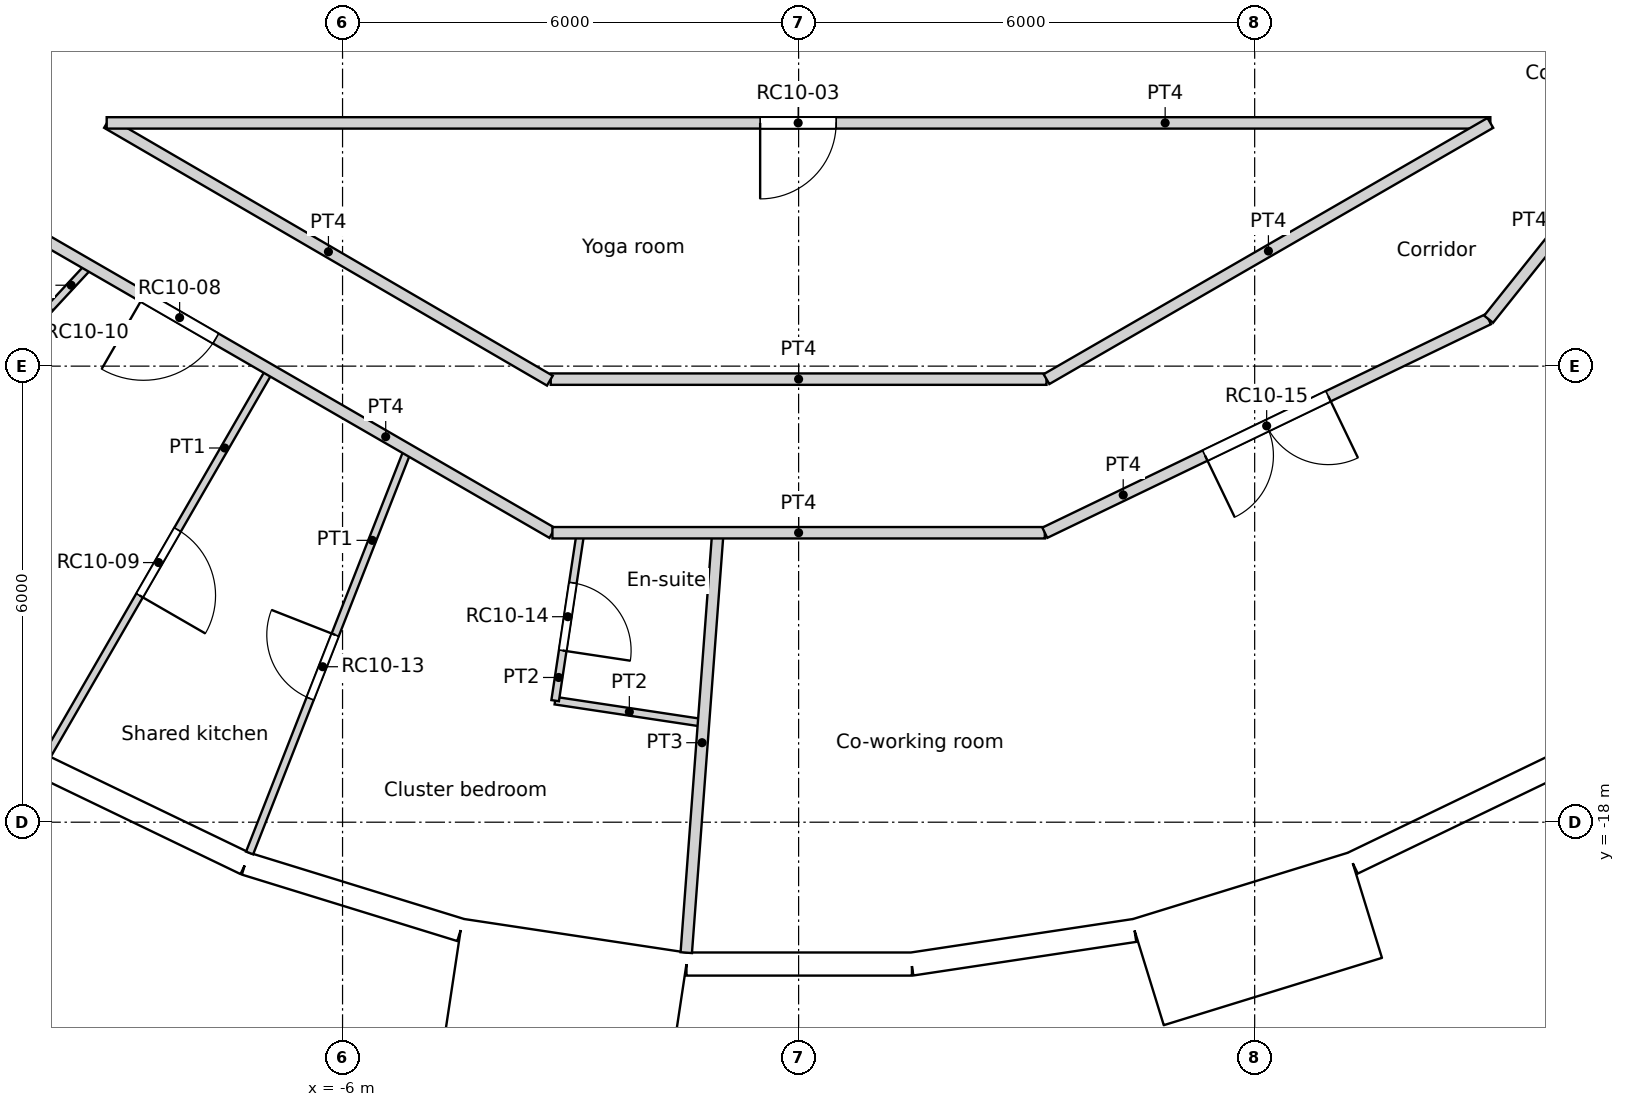
"""IFC4 building model, lengths in metres.
Left out: names, types, materials, properties, quantities, classifications, styles, units other than length and angle.
Written with IfcOpenShell. Run it as: python <this file> out.ifc"""

import sys

from ifc_helpers import new_model, si_unit, direction, frame, frame_2d, origin, origin_2d, place, context, subcontext, project, spatial, rectangle, circle, extrude, element, fill, save


model = new_model("IFC4")
c1 = context("Model", 3, precision=1e-05, world=origin(), true_north=direction((0.0, 1.0)))
c2 = subcontext(c1, "Body", "Model", "MODEL_VIEW")
j1 = project(units=[si_unit("LENGTHUNIT", "METRE"), si_unit("PLANEANGLEUNIT", "RADIAN")], contexts=[c1])
p1 = place(None, origin())
s1 = spatial("IfcSite", under=j1, at=p1, CompositionType="ELEMENT")
p2 = place(p1, origin())
s2 = spatial("IfcBuilding", under=s1, at=p2, CompositionType="ELEMENT")
p3 = place(p2, frame((0.0, 0.0, 323.4)))
s3 = spatial("IfcBuildingStorey", under=s2, at=p3, CompositionType="ELEMENT", Elevation=323.4)
for number, where, z_axis, x_axis in (
    (1, (-9.411, -16.301, 0.0), (0.0, 0.0, 1.0), (1.0, 0.0, 0.0)),
    (2, (-4.188, -18.35, 0.0), (0.0, 0.0, 1.0), (1.0, 0.0, 0.0)),
    (3, (1.406, -18.77, 0.0), (0.0, 0.0, 1.0), (1.0, 0.0, 0.0)),
    (4, (6.876, -17.521, 0.0), (0.0, 0.0, 1.0), (1.0, 0.0, 0.0)),
):
    element("IfcColumn", number, at=place(p3, frame(where, z_axis=z_axis, x_axis=x_axis)), inside=s3, PredefinedType="COLUMN", context=c2, shape_type="SweptSolid", body=[
        extrude(circle(Radius=0.45, at=origin_2d()), origin(), (0.0, 0.0, 1.0), 3.6),
    ])
p4 = place(p3, frame((-9.947, -17.259, 0.0), z_axis=(0.0, 0.0, 1.0), x_axis=(0.900939615635, -0.433944476838, 0.0)))
e5 = element("IfcWall", 5, at=p4, inside=s3, PredefinedType="SOLIDWALL", context=c2, shape_type="SweptSolid", body=[
    extrude(rectangle(XDim=2.962, YDim=0.3, at=frame_2d((1.481, 0.0))), origin(), (0.0, 0.0, 1.0), 3.25),
])
p5 = place(p4, frame((1.481, 0.0, 1.55)))
e6 = element("IfcOpeningElement", 6, at=p5, cuts=e5, PredefinedType="OPENING", context=c2, shape_type="SweptSolid", body=[
    extrude(circle(Radius=0.9, at=origin_2d()), frame((0.0, 0.16, 0.0), z_axis=(0.0, -1.0, 0.0), x_axis=(1.0, 0.0, 0.0)), (0.0, 0.0, 1.0), 0.32),
])
p6 = place(p3, frame((-7.278, -18.545, 0.0), z_axis=(0.0, 0.0, 1.0), x_axis=(0.95558635705, -0.294711238707, 0.0)))
e7 = element("IfcWall", 7, at=p6, inside=s3, PredefinedType="SOLIDWALL", context=c2, shape_type="SweptSolid", body=[
    extrude(rectangle(XDim=2.962, YDim=0.3, at=frame_2d((1.481, 0.0))), origin(), (0.0, 0.0, 1.0), 3.25),
])
p7 = place(p6, frame((1.481, 0.0, 1.55)))
e8 = element("IfcOpeningElement", 8, at=p7, cuts=e7, PredefinedType="OPENING", context=c2, shape_type="SweptSolid", body=[
    extrude(circle(Radius=0.9, at=origin_2d()), frame((0.0, 0.16, 0.0), z_axis=(0.0, -1.0, 0.0), x_axis=(1.0, 0.0, 0.0)), (0.0, 0.0, 1.0), 0.32),
])
p8 = place(p3, frame((-4.53, -19.989, -0.35), z_axis=(0.0, 0.0, 1.0), x_axis=(0.988836445254, -0.149004981587, 0.0)))
e9 = element("IfcWall", 9, at=p8, inside=s3, PredefinedType="ELEMENTEDWALL", context=c2, shape_type="SweptSolid", body=[
    extrude(rectangle(XDim=3.0, YDim=1.45, at=frame_2d((1.5, 0.0))), origin(), (0.0, 0.0, 1.0), 3.6),
])
p9 = place(p8, frame((1.5, 0.0, 1.9)))
e10 = element("IfcOpeningElement", 10, at=p9, cuts=e9, PredefinedType="OPENING", context=c2, shape_type="SweptSolid", body=[
    extrude(circle(Radius=0.9, at=origin_2d()), frame((0.0, 0.735, 0.0), z_axis=(0.0, -1.0, 0.0), x_axis=(1.0, 0.0, 0.0)), (0.0, 0.0, 1.0), 1.47),
])
p10 = place(p3, frame((-1.473, -19.866, 0.0), z_axis=(0.0, 0.0, 1.0), x_axis=(1.0, 0.0, 0.0)))
e11 = element("IfcWall", 11, at=p10, inside=s3, PredefinedType="SOLIDWALL", context=c2, shape_type="SweptSolid", body=[
    extrude(rectangle(XDim=2.962, YDim=0.3, at=frame_2d((1.481, 0.0))), origin(), (0.0, 0.0, 1.0), 3.25),
])
p11 = place(p10, frame((1.481, 0.0, 1.55)))
e12 = element("IfcOpeningElement", 12, at=p11, cuts=e11, PredefinedType="OPENING", context=c2, shape_type="SweptSolid", body=[
    extrude(circle(Radius=0.9, at=origin_2d()), frame((0.0, 0.16, 0.0), z_axis=(0.0, -1.0, 0.0), x_axis=(1.0, 0.0, 0.0)), (0.0, 0.0, 1.0), 0.32),
])
p12 = place(p3, frame((1.489, -19.866, 0.0), z_axis=(0.0, 0.0, 1.0), x_axis=(0.988835775663, 0.149009425104, 0.0)))
e13 = element("IfcWall", 13, at=p12, inside=s3, PredefinedType="SOLIDWALL", context=c2, shape_type="SweptSolid", body=[
    extrude(rectangle(XDim=2.962, YDim=0.3, at=frame_2d((1.481, 0.0))), origin(), (0.0, 0.0, 1.0), 3.25),
])
p13 = place(p12, frame((1.481, 0.0, 1.55)))
e14 = element("IfcOpeningElement", 14, at=p13, cuts=e13, PredefinedType="OPENING", context=c2, shape_type="SweptSolid", body=[
    extrude(circle(Radius=0.9, at=origin_2d()), frame((0.0, 0.16, 0.0), z_axis=(0.0, -1.0, 0.0), x_axis=(1.0, 0.0, 0.0)), (0.0, 0.0, 1.0), 0.32),
])
p14 = place(p3, frame((4.592, -19.975, -0.35), z_axis=(0.0, 0.0, 1.0), x_axis=(0.955571139978, 0.294760574774, 0.0)))
e15 = element("IfcWall", 15, at=p14, inside=s3, PredefinedType="ELEMENTEDWALL", context=c2, shape_type="SweptSolid", body=[
    extrude(rectangle(XDim=3.0, YDim=1.45, at=frame_2d((1.5, 0.0))), origin(), (0.0, 0.0, 1.0), 3.6),
])
p15 = place(p14, frame((1.5, 0.0, 1.9)))
e16 = element("IfcOpeningElement", 16, at=p15, cuts=e15, PredefinedType="OPENING", context=c2, shape_type="SweptSolid", body=[
    extrude(circle(Radius=0.9, at=origin_2d()), frame((0.0, 0.735, 0.0), z_axis=(0.0, -1.0, 0.0), x_axis=(1.0, 0.0, 0.0)), (0.0, 0.0, 1.0), 1.47),
])
p16 = place(p3, frame((7.292, -18.538, 0.0), z_axis=(0.0, 0.0, 1.0), x_axis=(0.90095513435, 0.433912255978, 0.0)))
e17 = element("IfcWall", 17, at=p16, inside=s3, PredefinedType="SOLIDWALL", context=c2, shape_type="SweptSolid", body=[
    extrude(rectangle(XDim=2.962, YDim=0.3, at=frame_2d((1.481, 0.0))), origin(), (0.0, 0.0, 1.0), 3.25),
])
p17 = place(p16, frame((1.481, 0.0, 1.55)))
e18 = element("IfcOpeningElement", 18, at=p17, cuts=e17, PredefinedType="OPENING", context=c2, shape_type="SweptSolid", body=[
    extrude(circle(Radius=0.9, at=origin_2d()), frame((0.0, 0.16, 0.0), z_axis=(0.0, -1.0, 0.0), x_axis=(1.0, 0.0, 0.0)), (0.0, 0.0, 1.0), 0.32),
])
p18 = place(p3, frame((-9.103, -8.8, 0.0), z_axis=(0.0, 0.0, 1.0), x_axis=(1.0, 0.0, 0.0)))
e19 = element("IfcWall", 19, at=p18, inside=s3, PredefinedType="PARTITIONING", context=c2, shape_type="SweptSolid", body=[
    extrude(rectangle(XDim=18.204, YDim=0.15, at=frame_2d((9.102, 0.0))), origin(), (0.0, 0.0, 1.0), 3.25),
])
p19 = place(p18, frame((8.597, 0.0, 0.0)))
e20 = element("IfcOpeningElement", 20, at=p19, cuts=e19, PredefinedType="OPENING", context=c2, shape_type="SweptSolid", body=[
    extrude(rectangle(XDim=1.0, YDim=2.04, at=frame_2d((0.5, 1.02))), frame((0.0, 0.075, 0.0), z_axis=(0.0, -1.0, 0.0), x_axis=(1.0, 0.0, 0.0)), (0.0, 0.0, 1.0), 0.15),
])
p20 = place(p3, frame((9.078, -11.382, 0.0), z_axis=(0.0, 0.0, 1.0), x_axis=(0.624018330412, 0.781409702595, 0.0)))
e21 = element("IfcWall", 21, at=p20, inside=s3, PredefinedType="PARTITIONING", context=c2, shape_type="SweptSolid", body=[
    extrude(rectangle(XDim=3.301, YDim=0.15, at=frame_2d((1.65, 0.0))), origin(), (0.0, 0.0, 1.0), 3.25),
])
p21 = place(p3, frame((-9.099, -8.8, 0.0), z_axis=(0.0, 0.0, 1.0), x_axis=(0.864286794128, -0.502999341447, 0.0)))
e22 = element("IfcWall", 22, at=p21, inside=s3, PredefinedType="PARTITIONING", context=c2, shape_type="SweptSolid", body=[
    extrude(rectangle(XDim=6.741, YDim=0.15, at=frame_2d((3.371, 0.0))), origin(), (0.0, 0.0, 1.0), 3.25),
])
p22 = place(p3, frame((-10.671, -9.901, 0.0), z_axis=(0.0, 0.0, 1.0), x_axis=(0.865823993551, -0.500348690606, 0.0)))
e23 = element("IfcWall", 23, at=p22, inside=s3, PredefinedType="PARTITIONING", context=c2, shape_type="SweptSolid", body=[
    extrude(rectangle(XDim=8.582, YDim=0.15, at=frame_2d((4.291, 0.0))), origin(), (0.0, 0.0, 1.0), 3.25),
])
p23 = place(p22, frame((2.369, 0.0, 0.0)))
e24 = element("IfcOpeningElement", 24, at=p23, cuts=e23, PredefinedType="OPENING", context=c2, shape_type="SweptSolid", body=[
    extrude(rectangle(XDim=1.1, YDim=2.1, at=frame_2d((0.55, 1.05))), frame((0.0, 0.075, 0.0), z_axis=(0.0, -1.0, 0.0), x_axis=(1.0, 0.0, 0.0)), (0.0, 0.0, 1.0), 0.15),
])
p24 = place(p3, frame((-3.261, -12.171, 0.0), z_axis=(0.0, 0.0, 1.0), x_axis=(1.0, 0.0, 0.0)))
e25 = element("IfcWall", 25, at=p24, inside=s3, PredefinedType="PARTITIONING", context=c2, shape_type="SweptSolid", body=[
    extrude(rectangle(XDim=6.522, YDim=0.15, at=frame_2d((3.261, 0.0))), origin(), (0.0, 0.0, 1.0), 3.25),
])
p25 = place(p3, frame((3.261, -12.171, 0.0), z_axis=(0.0, 0.0, 1.0), x_axis=(0.866066809554, 0.499928276245, 0.0)))
e26 = element("IfcWall", 26, at=p25, inside=s3, PredefinedType="PARTITIONING", context=c2, shape_type="SweptSolid", body=[
    extrude(rectangle(XDim=6.743, YDim=0.15, at=frame_2d((3.371, 0.0))), origin(), (0.0, 0.0, 1.0), 3.25),
])
p26 = place(p3, frame((-3.239, -14.192, 0.0), z_axis=(0.0, 0.0, 1.0), x_axis=(1.0, 0.0, 0.0)))
e27 = element("IfcWall", 27, at=p26, inside=s3, PredefinedType="PARTITIONING", context=c2, shape_type="SweptSolid", body=[
    extrude(rectangle(XDim=6.478, YDim=0.15, at=frame_2d((3.239, 0.0))), origin(), (0.0, 0.0, 1.0), 3.25),
])
p27 = place(p3, frame((3.239, -14.192, 0.0), z_axis=(0.0, 0.0, 1.0), x_axis=(0.900976027191, 0.433868872388, 0.0)))
e28 = element("IfcWall", 28, at=p27, inside=s3, PredefinedType="PARTITIONING", context=c2, shape_type="SweptSolid", body=[
    extrude(rectangle(XDim=6.479, YDim=0.15, at=frame_2d((3.239, 0.0))), origin(), (0.0, 0.0, 1.0), 3.25),
])
p28 = place(p27, frame((2.34, 0.0, 0.0)))
e29 = element("IfcOpeningElement", 29, at=p28, cuts=e28, PredefinedType="OPENING", context=c2, shape_type="SweptSolid", body=[
    extrude(rectangle(XDim=1.8, YDim=2.1, at=frame_2d((0.9, 1.05))), frame((0.0, 0.075, 0.0), z_axis=(0.0, -1.0, 0.0), x_axis=(1.0, 0.0, 0.0)), (0.0, 0.0, 1.0), 0.15),
])
p29 = place(p3, frame((-9.886, -17.122, 0.0), z_axis=(0.0, 0.0, 1.0), x_axis=(0.500022903925, 0.866012179793, 0.0)))
e30 = element("IfcWall", 30, at=p29, inside=s3, PredefinedType="PARTITIONING", context=c2, shape_type="SweptSolid", body=[
    extrude(rectangle(XDim=5.862, YDim=0.1, at=frame_2d((2.931, 0.0))), origin(), (0.0, 0.0, 1.0), 3.25),
])
p30 = place(p29, frame((2.43, 0.0, 0.0)))
e31 = element("IfcOpeningElement", 31, at=p30, cuts=e30, PredefinedType="OPENING", context=c2, shape_type="SweptSolid", body=[
    extrude(rectangle(XDim=1.0, YDim=2.04, at=frame_2d((0.5, 1.02))), frame((0.0, 0.05, 0.0), z_axis=(0.0, -1.0, 0.0), x_axis=(1.0, 0.0, 0.0)), (0.0, 0.0, 1.0), 0.1),
])
p31 = place(p3, frame((-10.973, -12.447, 0.0), z_axis=(0.0, 0.0, 1.0), x_axis=(0.680296065293, 0.732937421303, 0.0)))
e32 = element("IfcWall", 32, at=p31, inside=s3, PredefinedType="PARTITIONING", context=c2, shape_type="SweptSolid", body=[
    extrude(rectangle(XDim=2.416, YDim=0.1, at=frame_2d((1.208, 0.0))), origin(), (0.0, 0.0, 1.0), 3.25),
])
p32 = place(p31, frame((0.758, 0.0, 0.0)))
e33 = element("IfcOpeningElement", 33, at=p32, cuts=e32, PredefinedType="OPENING", context=c2, shape_type="SweptSolid", body=[
    extrude(rectangle(XDim=0.9, YDim=2.0, at=frame_2d((0.45, 1.0))), frame((0.0, 0.05, 0.0), z_axis=(0.0, -1.0, 0.0), x_axis=(1.0, 0.0, 0.0)), (0.0, 0.0, 1.0), 0.1),
])
p33 = place(p3, frame((-7.223, -18.405, 0.0), z_axis=(0.0, 0.0, 1.0), x_axis=(0.365331902423, 0.930877328691, 0.0)))
e34 = element("IfcWall", 34, at=p33, inside=s3, PredefinedType="PARTITIONING", context=c2, shape_type="SweptSolid", body=[
    extrude(rectangle(XDim=5.704, YDim=0.1, at=frame_2d((2.852, 0.0))), origin(), (0.0, 0.0, 1.0), 3.25),
])
p34 = place(p33, frame((2.182, 0.0, 0.0)))
e35 = element("IfcOpeningElement", 35, at=p34, cuts=e34, PredefinedType="OPENING", context=c2, shape_type="SweptSolid", body=[
    extrude(rectangle(XDim=0.9, YDim=2.1, at=frame_2d((0.45, 1.05))), frame((0.0, 0.05, 0.0), z_axis=(0.0, -1.0, 0.0), x_axis=(1.0, 0.0, 0.0)), (0.0, 0.0, 1.0), 0.1),
])
p35 = place(p3, frame((-3.203, -16.401, 0.0), z_axis=(0.0, 0.0, 1.0), x_axis=(0.148960349288, 0.988843169739, 0.0)))
e36 = element("IfcWall", 36, at=p35, inside=s3, PredefinedType="PARTITIONING", context=c2, shape_type="SweptSolid", body=[
    extrude(rectangle(XDim=2.234, YDim=0.1, at=frame_2d((1.117, 0.0))), origin(), (0.0, 0.0, 1.0), 3.25),
])
p36 = place(p35, frame((0.667, 0.0, 0.0)))
e37 = element("IfcOpeningElement", 37, at=p36, cuts=e36, PredefinedType="OPENING", context=c2, shape_type="SweptSolid", body=[
    extrude(rectangle(XDim=0.9, YDim=2.04, at=frame_2d((0.45, 1.02))), frame((0.0, 0.05, 0.0), z_axis=(0.0, -1.0, 0.0), x_axis=(1.0, 0.0, 0.0)), (0.0, 0.0, 1.0), 0.1),
])
p37 = place(p3, frame((-3.203, -16.401, 0.0), z_axis=(0.0, 0.0, 1.0), x_axis=(0.988831780565, -0.149035934407, 0.0)))
e38 = element("IfcWall", 38, at=p37, inside=s3, PredefinedType="PARTITIONING", context=c2, shape_type="SweptSolid", body=[
    extrude(rectangle(XDim=1.974, YDim=0.1, at=frame_2d((0.987, 0.0))), origin(), (0.0, 0.0, 1.0), 3.25),
])
p38 = place(p3, frame((-1.478, -19.716, 0.0), z_axis=(0.0, 0.0, 1.0), x_axis=(0.074923617461, 0.997189275688, 0.0)))
e39 = element("IfcWall", 39, at=p38, inside=s3, PredefinedType="PARTITIONING", context=c2, shape_type="SweptSolid", body=[
    extrude(rectangle(XDim=5.54, YDim=0.15, at=frame_2d((2.77, 0.0))), origin(), (0.0, 0.0, 1.0), 3.25),
])
p39 = place(p5, origin())
e40 = element("IfcWindow", 40, at=p39, inside=s3, PartitioningType="SINGLE_PANEL", PredefinedType="WINDOW", context=c2, shape_type="SweptSolid", body=[
    extrude(circle(Radius=0.9, at=origin_2d()), frame((0.0, 0.12, 0.0), z_axis=(0.0, -1.0, 0.0), x_axis=(1.0, 0.0, 0.0)), (0.0, 0.0, 1.0), 0.1),
])
fill(e6, e40)
p40 = place(p7, origin())
e41 = element("IfcWindow", 41, at=p40, inside=s3, PartitioningType="SINGLE_PANEL", PredefinedType="WINDOW", context=c2, shape_type="SweptSolid", body=[
    extrude(circle(Radius=0.9, at=origin_2d()), frame((0.0, 0.12, 0.0), z_axis=(0.0, -1.0, 0.0), x_axis=(1.0, 0.0, 0.0)), (0.0, 0.0, 1.0), 0.1),
])
fill(e8, e41)
p41 = place(p9, origin())
e42 = element("IfcWindow", 42, at=p41, inside=s3, PartitioningType="SINGLE_PANEL", PredefinedType="WINDOW", context=c2, shape_type="SweptSolid", body=[
    extrude(circle(Radius=0.9, at=origin_2d()), frame((0.0, 0.695, 0.0), z_axis=(0.0, -1.0, 0.0), x_axis=(1.0, 0.0, 0.0)), (0.0, 0.0, 1.0), 0.1),
])
fill(e10, e42)
p42 = place(p11, origin())
e43 = element("IfcWindow", 43, at=p42, inside=s3, PartitioningType="SINGLE_PANEL", PredefinedType="WINDOW", context=c2, shape_type="SweptSolid", body=[
    extrude(circle(Radius=0.9, at=origin_2d()), frame((0.0, 0.12, 0.0), z_axis=(0.0, -1.0, 0.0), x_axis=(1.0, 0.0, 0.0)), (0.0, 0.0, 1.0), 0.1),
])
fill(e12, e43)
p43 = place(p13, origin())
e44 = element("IfcWindow", 44, at=p43, inside=s3, PartitioningType="SINGLE_PANEL", PredefinedType="WINDOW", context=c2, shape_type="SweptSolid", body=[
    extrude(circle(Radius=0.9, at=origin_2d()), frame((0.0, 0.12, 0.0), z_axis=(0.0, -1.0, 0.0), x_axis=(1.0, 0.0, 0.0)), (0.0, 0.0, 1.0), 0.1),
])
fill(e14, e44)
p44 = place(p15, origin())
e45 = element("IfcWindow", 45, at=p44, inside=s3, PartitioningType="SINGLE_PANEL", PredefinedType="WINDOW", context=c2, shape_type="SweptSolid", body=[
    extrude(circle(Radius=0.9, at=origin_2d()), frame((0.0, 0.695, 0.0), z_axis=(0.0, -1.0, 0.0), x_axis=(1.0, 0.0, 0.0)), (0.0, 0.0, 1.0), 0.1),
])
fill(e16, e45)
p45 = place(p17, origin())
e46 = element("IfcWindow", 46, at=p45, inside=s3, PartitioningType="SINGLE_PANEL", PredefinedType="WINDOW", context=c2, shape_type="SweptSolid", body=[
    extrude(circle(Radius=0.9, at=origin_2d()), frame((0.0, 0.12, 0.0), z_axis=(0.0, -1.0, 0.0), x_axis=(1.0, 0.0, 0.0)), (0.0, 0.0, 1.0), 0.1),
])
fill(e18, e46)
p46 = place(p19, origin())
e47 = element("IfcDoor", 47, at=p46, inside=s3, OperationType="SINGLE_SWING_RIGHT", PredefinedType="DOOR", context=c2, shape_type="SweptSolid", body=[
    extrude(rectangle(XDim=1.0, YDim=2.04, at=frame_2d((0.5, 1.02))), frame((0.0, 0.025, 0.0), z_axis=(0.0, -1.0, 0.0), x_axis=(1.0, 0.0, 0.0)), (0.0, 0.0, 1.0), 0.05),
])
fill(e20, e47)
p47 = place(p23, origin())
e48 = element("IfcDoor", 48, at=p47, inside=s3, OperationType="SINGLE_SWING_RIGHT", PredefinedType="DOOR", context=c2, shape_type="SweptSolid", body=[
    extrude(rectangle(XDim=1.1, YDim=2.1, at=frame_2d((0.55, 1.05))), frame((0.0, 0.025, 0.0), z_axis=(0.0, -1.0, 0.0), x_axis=(1.0, 0.0, 0.0)), (0.0, 0.0, 1.0), 0.05),
])
fill(e24, e48)
p48 = place(p30, origin())
e49 = element("IfcDoor", 49, at=p48, inside=s3, OperationType="SINGLE_SWING_RIGHT", PredefinedType="DOOR", context=c2, shape_type="SweptSolid", body=[
    extrude(rectangle(XDim=1.0, YDim=2.04, at=frame_2d((0.5, 1.02))), frame((0.0, 0.025, 0.0), z_axis=(0.0, -1.0, 0.0), x_axis=(1.0, 0.0, 0.0)), (0.0, 0.0, 1.0), 0.05),
])
fill(e31, e49)
p49 = place(p34, origin())
e50 = element("IfcDoor", 50, at=p49, inside=s3, OperationType="SINGLE_SWING_RIGHT", PredefinedType="DOOR", context=c2, shape_type="SweptSolid", body=[
    extrude(rectangle(XDim=0.9, YDim=2.1, at=frame_2d((0.45, 1.05))), frame((0.0, 0.025, 0.0), z_axis=(0.0, -1.0, 0.0), x_axis=(1.0, 0.0, 0.0)), (0.0, 0.0, 1.0), 0.05),
])
fill(e35, e50)
p50 = place(p36, origin())
e51 = element("IfcDoor", 51, at=p50, inside=s3, OperationType="SINGLE_SWING_RIGHT", PredefinedType="DOOR", context=c2, shape_type="SweptSolid", body=[
    extrude(rectangle(XDim=0.9, YDim=2.04, at=frame_2d((0.45, 1.02))), frame((0.0, 0.025, 0.0), z_axis=(0.0, -1.0, 0.0), x_axis=(1.0, 0.0, 0.0)), (0.0, 0.0, 1.0), 0.05),
])
fill(e37, e51)
p51 = place(p28, origin())
e52 = element("IfcDoor", 52, at=p51, inside=s3, OperationType="DOUBLE_DOOR_SINGLE_SWING", PredefinedType="DOOR", context=c2, shape_type="SweptSolid", body=[
    extrude(rectangle(XDim=1.8, YDim=2.1, at=frame_2d((0.9, 1.05))), frame((0.0, 0.025, 0.0), z_axis=(0.0, -1.0, 0.0), x_axis=(1.0, 0.0, 0.0)), (0.0, 0.0, 1.0), 0.05),
])
fill(e29, e52)
save(model, sys.argv[1])
